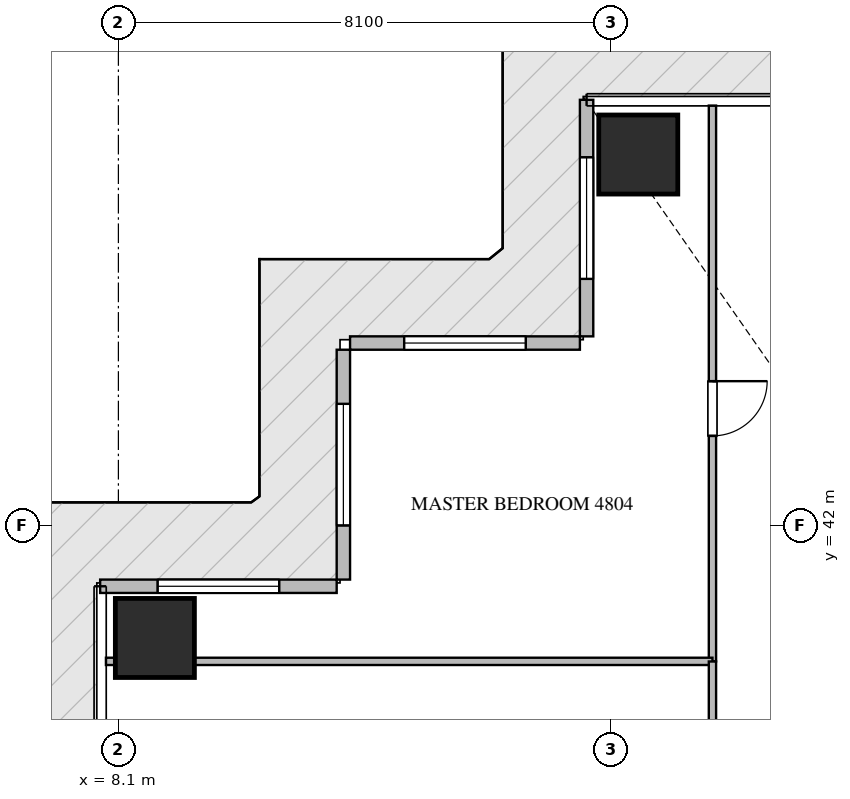
"""IFC4 building model, lengths in metres.
Left out: names, types, materials, properties, quantities, classifications, styles, units other than length and angle.
Written with IfcOpenShell. Run it as: python <this file> out.ifc"""

import sys

from ifc_helpers import new_model, si_unit, direction, frame, frame_2d, origin, origin_2d, place, context, subcontext, project, spatial, rectangle, extrude, source, transform, mapped, element, fill, save


model = new_model("IFC4")
c1 = context("Model", 3, precision=1e-05, world=origin(), true_north=direction((0.0, 1.0)))
c2 = subcontext(c1, "Body", "Model", "MODEL_VIEW")
j1 = project(units=[si_unit("LENGTHUNIT", "METRE"), si_unit("PLANEANGLEUNIT", "RADIAN")], contexts=[c1])
p1 = place(None, origin())
s1 = spatial("IfcSite", under=j1, at=p1, CompositionType="ELEMENT")
p2 = place(p1, origin())
s2 = spatial("IfcBuilding", under=s1, at=p2, CompositionType="ELEMENT")
p3 = place(p2, frame((0.0, 0.0, 191.4)))
s3 = spatial("IfcBuildingStorey", under=s2, at=p3, CompositionType="ELEMENT", Elevation=191.4)
m1 = source(origin(), c2, "Body", "SweptSolid", [
    extrude(rectangle(XDim=1.3, YDim=1.3, at=origin_2d()), origin(), (0.0, 0.0, 1.0), 3.75),
])
for number, where, z_axis, x_axis in (
    (1, (16.65, 48.1, -0.26), (0.0, 0.0, 1.0), (1.0, 0.0, 0.0)),
    (2, (8.7, 40.15, -0.26), (0.0, 0.0, 1.0), (1.0, 0.0, 0.0)),
):
    element("IfcColumn", number, at=place(p3, frame(where, z_axis=z_axis, x_axis=x_axis)), inside=s3, PredefinedType="COLUMN", context=c2, shape_type="MappedRepresentation", body=[
        mapped(m1, transform((0.0, 0.0, 0.0), scale=1.0)),
    ])
p4 = place(p3, frame((15.8, 49.0, 0.0), z_axis=(0.0, 0.0, 1.0), x_axis=(0.0, -1.0, 0.0)))
e3 = element("IfcWall", 3, at=p4, inside=s3, PredefinedType="ELEMENTEDWALL", context=c2, shape_type="SweptSolid", body=[
    extrude(rectangle(XDim=3.89, YDim=0.22, at=frame_2d((1.945, 0.0))), origin(), (0.0, 0.0, 1.0), 3.475),
])
p5 = place(p4, frame((0.945, 0.0, 0.65)))
e4 = element("IfcOpeningElement", 4, at=p5, cuts=e3, PredefinedType="OPENING", context=c2, shape_type="SweptSolid", body=[
    extrude(rectangle(XDim=2.0, YDim=2.2, at=frame_2d((1.0, 1.1))), frame((0.0, 0.12, 0.0), z_axis=(0.0, -1.0, 0.0), x_axis=(1.0, 0.0, 0.0)), (0.0, 0.0, 1.0), 0.24),
])
p6 = place(p3, frame((15.69, 45.0, 0.0), z_axis=(0.0, 0.0, 1.0), x_axis=(-1.0, 0.0, 0.0)))
e5 = element("IfcWall", 5, at=p6, inside=s3, PredefinedType="ELEMENTEDWALL", context=c2, shape_type="SweptSolid", body=[
    extrude(rectangle(XDim=3.78, YDim=0.22, at=frame_2d((1.89, 0.0))), origin(), (0.0, 0.0, 1.0), 3.475),
])
p7 = place(p6, frame((0.89, 0.0, 0.65)))
e6 = element("IfcOpeningElement", 6, at=p7, cuts=e5, PredefinedType="OPENING", context=c2, shape_type="SweptSolid", body=[
    extrude(rectangle(XDim=2.0, YDim=2.2, at=frame_2d((1.0, 1.1))), frame((0.0, 0.12, 0.0), z_axis=(0.0, -1.0, 0.0), x_axis=(1.0, 0.0, 0.0)), (0.0, 0.0, 1.0), 0.24),
])
p8 = place(p3, frame((11.8, 44.89, 0.0), z_axis=(0.0, 0.0, 1.0), x_axis=(0.0, -1.0, 0.0)))
e7 = element("IfcWall", 7, at=p8, inside=s3, PredefinedType="ELEMENTEDWALL", context=c2, shape_type="SweptSolid", body=[
    extrude(rectangle(XDim=3.78, YDim=0.22, at=frame_2d((1.89, 0.0))), origin(), (0.0, 0.0, 1.0), 3.475),
])
p9 = place(p8, frame((0.89, 0.0, 0.65)))
e8 = element("IfcOpeningElement", 8, at=p9, cuts=e7, PredefinedType="OPENING", context=c2, shape_type="SweptSolid", body=[
    extrude(rectangle(XDim=2.0, YDim=2.2, at=frame_2d((1.0, 1.1))), frame((0.0, 0.12, 0.0), z_axis=(0.0, -1.0, 0.0), x_axis=(1.0, 0.0, 0.0)), (0.0, 0.0, 1.0), 0.24),
])
p10 = place(p3, frame((11.69, 41.0, 0.0), z_axis=(0.0, 0.0, 1.0), x_axis=(-1.0, 0.0, 0.0)))
e9 = element("IfcWall", 9, at=p10, inside=s3, PredefinedType="ELEMENTEDWALL", context=c2, shape_type="SweptSolid", body=[
    extrude(rectangle(XDim=3.89, YDim=0.22, at=frame_2d((1.945, 0.0))), origin(), (0.0, 0.0, 1.0), 3.475),
])
p11 = place(p10, frame((0.945, 0.0, 0.65)))
e10 = element("IfcOpeningElement", 10, at=p11, cuts=e9, PredefinedType="OPENING", context=c2, shape_type="SweptSolid", body=[
    extrude(rectangle(XDim=2.0, YDim=2.2, at=frame_2d((1.0, 1.1))), frame((0.0, 0.12, 0.0), z_axis=(0.0, -1.0, 0.0), x_axis=(1.0, 0.0, 0.0)), (0.0, 0.0, 1.0), 0.24),
])
p12 = place(p3, frame((17.87, 48.905, 0.0), z_axis=(0.0, 0.0, 1.0), x_axis=(0.0, -1.0, 0.0)))
e11 = element("IfcWall", 11, at=p12, inside=s3, PredefinedType="PARTITIONING", context=c2, shape_type="SweptSolid", body=[
    extrude(rectangle(XDim=9.14, YDim=0.12, at=frame_2d((4.57, 0.0))), origin(), (0.0, 0.0, 1.0), 3.49),
])
p13 = place(p12, frame((4.532, 0.0, 0.0)))
e12 = element("IfcOpeningElement", 12, at=p13, cuts=e11, PredefinedType="OPENING", context=c2, shape_type="SweptSolid", body=[
    extrude(rectangle(XDim=0.9, YDim=2.1, at=frame_2d((0.45, 1.05))), frame((0.0, 0.07, 0.0), z_axis=(0.0, -1.0, 0.0), x_axis=(1.0, 0.0, 0.0)), (0.0, 0.0, 1.0), 0.14),
])
p14 = place(p3, frame((7.895, 39.765, 0.0), z_axis=(0.0, 0.0, 1.0), x_axis=(1.0, 0.0, 0.0)))
e13 = element("IfcWall", 13, at=p14, inside=s3, PredefinedType="PARTITIONING", context=c2, shape_type="SweptSolid", body=[
    extrude(rectangle(XDim=9.975, YDim=0.12, at=frame_2d((4.988, 0.0))), origin(), (0.0, 0.0, 1.0), 3.49),
])
p15 = place(p3, frame((17.87, 39.763, 0.0), z_axis=(0.0, 0.0, 1.0), x_axis=(0.0, -1.0, 0.0)))
e14 = element("IfcWall", 14, at=p15, inside=s3, PredefinedType="PARTITIONING", context=c2, shape_type="SweptSolid", body=[
    extrude(rectangle(XDim=4.113, YDim=0.12, at=frame_2d((2.057, 0.0))), origin(), (0.0, 0.0, 1.0), 3.49),
])
p16 = place(p15, frame((1.631, 0.0, 0.0)))
e15 = element("IfcOpeningElement", 15, at=p16, cuts=e14, PredefinedType="OPENING", context=c2, shape_type="SweptSolid", body=[
    extrude(rectangle(XDim=0.85, YDim=2.1, at=frame_2d((0.425, 1.05))), frame((0.0, 0.07, 0.0), z_axis=(0.0, -1.0, 0.0), x_axis=(1.0, 0.0, 0.0)), (0.0, 0.0, 1.0), 0.14),
])
m2 = source(origin(), c2, "Body", "SweptSolid", [
    extrude(rectangle(XDim=2.0, YDim=2.2, at=frame_2d((1.0, 1.1))), frame((0.0, 0.03, 0.0), z_axis=(0.0, -1.0, 0.0), x_axis=(1.0, 0.0, 0.0)), (0.0, 0.0, 1.0), 0.06),
])
p17 = place(p5, origin())
e16 = element("IfcWindow", 16, at=p17, inside=s3, PartitioningType="SINGLE_PANEL", PredefinedType="WINDOW", context=c2, shape_type="MappedRepresentation", body=[
    mapped(m2, transform((0.0, 0.0, 0.0), scale=1.0)),
])
fill(e4, e16)
p18 = place(p7, origin())
e17 = element("IfcWindow", 17, at=p18, inside=s3, PartitioningType="SINGLE_PANEL", PredefinedType="WINDOW", context=c2, shape_type="MappedRepresentation", body=[
    mapped(m2, transform((0.0, 0.0, 0.0), scale=1.0)),
])
fill(e6, e17)
p19 = place(p9, origin())
e18 = element("IfcWindow", 18, at=p19, inside=s3, PartitioningType="SINGLE_PANEL", PredefinedType="WINDOW", context=c2, shape_type="MappedRepresentation", body=[
    mapped(m2, transform((0.0, 0.0, 0.0), scale=1.0)),
])
fill(e8, e18)
p20 = place(p11, origin())
e19 = element("IfcWindow", 19, at=p20, inside=s3, PartitioningType="SINGLE_PANEL", PredefinedType="WINDOW", context=c2, shape_type="MappedRepresentation", body=[
    mapped(m2, transform((0.0, 0.0, 0.0), scale=1.0)),
])
fill(e10, e19)
m3 = source(origin(), c2, "Body", "SweptSolid", [
    extrude(rectangle(XDim=0.9, YDim=2.1, at=frame_2d((0.45, 1.05))), frame((0.0, 0.025, 0.0), z_axis=(0.0, -1.0, 0.0), x_axis=(1.0, 0.0, 0.0)), (0.0, 0.0, 1.0), 0.05),
])
p21 = place(p13, origin())
e20 = element("IfcDoor", 20, at=p21, inside=s3, OperationType="SINGLE_SWING_LEFT", PredefinedType="DOOR", context=c2, shape_type="MappedRepresentation", body=[
    mapped(m3, transform((0.0, 0.0, 0.0), scale=1.0)),
])
fill(e12, e20)
save(model, sys.argv[1])
